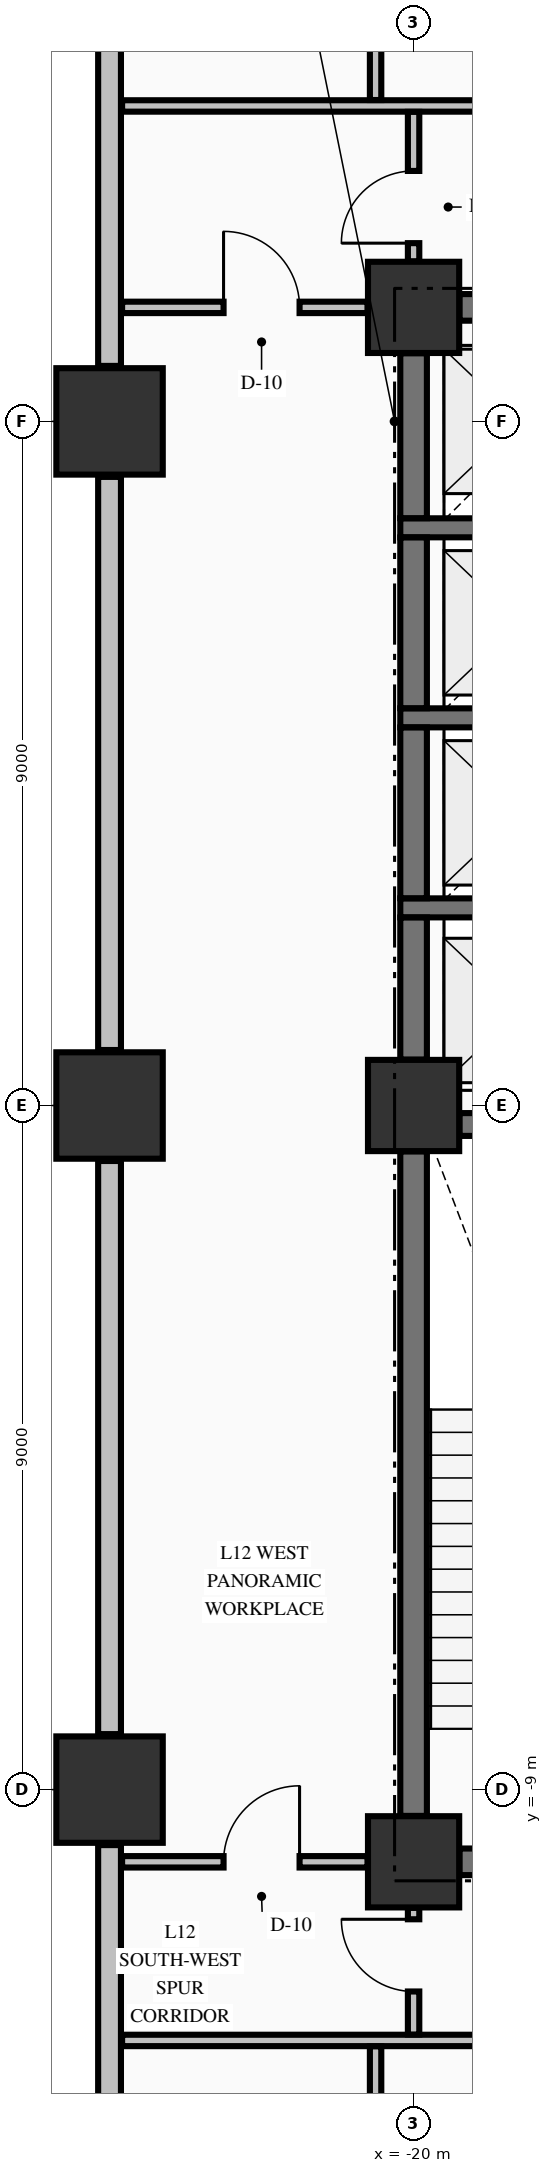
"""IFC4 building model, lengths in metres.
Left out: names, types, materials, properties, quantities, classifications, styles, units other than length and angle.
Written with IfcOpenShell. Run it as: python <this file> out.ifc"""

import sys

from ifc_helpers import new_model, si_unit, direction, frame, frame_2d, origin, origin_2d, place, context, subcontext, project, spatial, rectangle, extrude, element, fill, save


model = new_model("IFC4")
c1 = context("Model", 3, precision=1e-05, world=origin(), true_north=direction((0.0, 1.0)))
c2 = subcontext(c1, "Body", "Model", "MODEL_VIEW")
j1 = project(units=[si_unit("LENGTHUNIT", "METRE"), si_unit("PLANEANGLEUNIT", "RADIAN")], contexts=[c1])
p1 = place(None, origin())
s1 = spatial("IfcSite", under=j1, at=p1, CompositionType="ELEMENT")
p2 = place(p1, origin())
s2 = spatial("IfcBuilding", under=s1, at=p2, CompositionType="ELEMENT")
p3 = place(p2, frame((0.0, 0.0, 52.19)))
s3 = spatial("IfcBuildingStorey", under=s2, at=p3, CompositionType="ELEMENT", Elevation=52.19)
for number, where, z_axis, x_axis in (
    (1, (-24.0, -9.0, -0.425), (0.0, 0.0, 1.0), (1.0, 0.0, 0.0)),
    (2, (-24.0, 0.0, -0.425), (0.0, 0.0, 1.0), (1.0, 0.0, 0.0)),
    (3, (-24.0, 9.0, -0.425), (0.0, 0.0, 1.0), (1.0, 0.0, 0.0)),
):
    element("IfcColumn", number, at=place(p3, frame(where, z_axis=z_axis, x_axis=x_axis)), inside=s3, PredefinedType="COLUMN", context=c2, shape_type="SweptSolid", body=[
        extrude(rectangle(XDim=1.4, YDim=1.4, at=origin_2d()), origin(), (0.0, 0.0, 1.0), 5.0),
    ])
for number, where, z_axis, x_axis in (
    (4, (-20.0, -9.95, -0.425), (0.0, 0.0, 1.0), (1.0, 0.0, 0.0)),
    (5, (-20.0, 10.5, -0.425), (0.0, 0.0, 1.0), (1.0, 0.0, 0.0)),
    (6, (-20.0, 0.0, -0.425), (0.0, 0.0, 1.0), (1.0, 0.0, 0.0)),
):
    element("IfcColumn", number, at=place(p3, frame(where, z_axis=z_axis, x_axis=x_axis)), inside=s3, PredefinedType="COLUMN", context=c2, shape_type="SweptSolid", body=[
        extrude(rectangle(XDim=1.2, YDim=1.2, at=origin_2d()), origin(), (0.0, 0.0, 1.0), 5.0),
    ])
p4 = place(p3, frame((-24.0, -9.73, 0.0), z_axis=(0.0, 0.0, 1.0), x_axis=(0.0, -1.0, 0.0)))
e7 = element("IfcWall", 7, at=p4, inside=s3, PredefinedType="STANDARD", context=c2, shape_type="SweptSolid", body=[
    extrude(rectangle(XDim=12.54, YDim=0.3, at=frame_2d((6.27, 0.0))), origin(), (0.0, 0.0, 1.0), 2.167),
])
for number, where, z_axis, x_axis in (
    (8, (-24.0, -0.73, 0.0), (0.0, 0.0, 1.0), (0.0, -1.0, 0.0)),
    (9, (-24.0, 8.27, 0.0), (0.0, 0.0, 1.0), (0.0, -1.0, 0.0)),
):
    element("IfcWall", number, at=place(p3, frame(where, z_axis=z_axis, x_axis=x_axis)), inside=s3, PredefinedType="STANDARD", context=c2, shape_type="SweptSolid", body=[
        extrude(rectangle(XDim=7.54, YDim=0.3, at=frame_2d((3.77, 0.0))), origin(), (0.0, 0.0, 1.0), 2.167),
    ])
p5 = place(p3, frame((-24.0, 22.27, 0.0), z_axis=(0.0, 0.0, 1.0), x_axis=(0.0, -1.0, 0.0)))
e10 = element("IfcWall", 10, at=p5, inside=s3, PredefinedType="STANDARD", context=c2, shape_type="SweptSolid", body=[
    extrude(rectangle(XDim=12.54, YDim=0.3, at=frame_2d((6.27, 0.0))), origin(), (0.0, 0.0, 1.0), 2.167),
])
p6 = place(p3, frame((-19.396, -9.95, 0.0), z_axis=(0.0, 0.0, 1.0), x_axis=(1.0, 0.0, 0.0)))
e11 = element("IfcWall", 11, at=p6, inside=s3, PredefinedType="SHEAR", context=c2, shape_type="SweptSolid", body=[
    extrude(rectangle(XDim=4.696, YDim=0.35, at=frame_2d((2.348, 0.0))), origin(), (0.0, 0.0, 1.0), 4.575),
])
p7 = place(p6, frame((0.571, 0.0, 0.0)))
e12 = element("IfcOpeningElement", 12, at=p7, cuts=e11, PredefinedType="OPENING", context=c2, shape_type="SweptSolid", body=[
    extrude(rectangle(XDim=1.05, YDim=2.15, at=frame_2d((0.525, 1.075))), frame((0.0, 0.185, 0.0), z_axis=(0.0, -1.0, 0.0), x_axis=(1.0, 0.0, 0.0)), (0.0, 0.0, 1.0), 0.37),
])
p8 = place(p3, frame((-19.396, -0.25, 0.0), z_axis=(0.0, 0.0, 1.0), x_axis=(1.0, 0.0, 0.0)))
e13 = element("IfcWall", 13, at=p8, inside=s3, PredefinedType="SHEAR", context=c2, shape_type="SweptSolid", body=[
    extrude(rectangle(XDim=7.792, YDim=0.3, at=frame_2d((3.896, 0.0))), origin(), (0.0, 0.0, 1.0), 4.575),
])
p9 = place(p8, frame((5.696, 0.0, 0.0)))
e14 = element("IfcOpeningElement", 14, at=p9, cuts=e13, PredefinedType="OPENING", context=c2, shape_type="SweptSolid", body=[
    extrude(rectangle(XDim=1.1, YDim=2.15, at=frame_2d((0.55, 1.075))), frame((0.0, 0.16, 0.0), z_axis=(0.0, -1.0, 0.0), x_axis=(1.0, 0.0, 0.0)), (0.0, 0.0, 1.0), 0.32),
])
for number, where, z_axis, x_axis in (
    (15, (-20.175, 2.6, 0.0), (0.0, 0.0, 1.0), (1.0, 0.0, 0.0)),
    (16, (-20.175, 5.1, 0.0), (0.0, 0.0, 1.0), (1.0, 0.0, 0.0)),
    (17, (-20.175, 7.6, 0.0), (0.0, 0.0, 1.0), (1.0, 0.0, 0.0)),
):
    element("IfcWall", number, at=place(p3, frame(where, z_axis=z_axis, x_axis=x_axis)), inside=s3, PredefinedType="SOLIDWALL", context=c2, shape_type="SweptSolid", body=[
        extrude(rectangle(XDim=3.1, YDim=0.25, at=frame_2d((1.55, 0.0))), origin(), (0.0, 0.0, 1.0), 4.575),
    ])
p10 = place(p3, frame((-19.396, 10.5, 0.0), z_axis=(0.0, 0.0, 1.0), x_axis=(1.0, 0.0, 0.0)))
e18 = element("IfcWall", 18, at=p10, inside=s3, PredefinedType="SHEAR", context=c2, shape_type="SweptSolid", body=[
    extrude(rectangle(XDim=4.696, YDim=0.35, at=frame_2d((2.348, 0.0))), origin(), (0.0, 0.0, 1.0), 4.575),
])
p11 = place(p10, frame((2.796, 0.0, 0.0)))
e19 = element("IfcOpeningElement", 19, at=p11, cuts=e18, PredefinedType="OPENING", context=c2, shape_type="SweptSolid", body=[
    extrude(rectangle(XDim=1.2, YDim=2.15, at=frame_2d((0.6, 1.075))), frame((0.0, 0.185, 0.0), z_axis=(0.0, -1.0, 0.0), x_axis=(1.0, 0.0, 0.0)), (0.0, 0.0, 1.0), 0.37),
])
p12 = place(p3, frame((-23.835, -12.3, 0.0), z_axis=(0.0, 0.0, 1.0), x_axis=(1.0, 0.0, 0.0)))
e20 = element("IfcWall", 20, at=p12, inside=s3, PredefinedType="PARTITIONING", context=c2, shape_type="SweptSolid", body=[
    extrude(rectangle(XDim=52.67, YDim=0.15, at=frame_2d((26.335, 0.0))), origin(), (0.0, 0.0, 1.0), 4.575),
])
p13 = place(p12, frame((8.99, 0.0, 0.0)))
e21 = element("IfcOpeningElement", 21, at=p13, cuts=e20, PredefinedType="OPENING", context=c2, shape_type="SweptSolid", body=[
    extrude(rectangle(XDim=1.05, YDim=2.15, at=frame_2d((0.525, 1.075))), frame((0.0, 0.085, 0.0), z_axis=(0.0, -1.0, 0.0), x_axis=(1.0, 0.0, 0.0)), (0.0, 0.0, 1.0), 0.17),
])
p14 = place(p12, frame((20.96, 0.0, 0.0)))
e22 = element("IfcOpeningElement", 22, at=p14, cuts=e20, PredefinedType="OPENING", context=c2, shape_type="SweptSolid", body=[
    extrude(rectangle(XDim=1.05, YDim=2.15, at=frame_2d((0.525, 1.075))), frame((0.0, 0.085, 0.0), z_axis=(0.0, -1.0, 0.0), x_axis=(1.0, 0.0, 0.0)), (0.0, 0.0, 1.0), 0.17),
])
p15 = place(p12, frame((29.11, 0.0, 0.0)))
e23 = element("IfcOpeningElement", 23, at=p15, cuts=e20, PredefinedType="OPENING", context=c2, shape_type="SweptSolid", body=[
    extrude(rectangle(XDim=1.05, YDim=2.15, at=frame_2d((0.525, 1.075))), frame((0.0, 0.085, 0.0), z_axis=(0.0, -1.0, 0.0), x_axis=(1.0, 0.0, 0.0)), (0.0, 0.0, 1.0), 0.17),
])
p16 = place(p3, frame((-23.835, -9.95, 0.0), z_axis=(0.0, 0.0, 1.0), x_axis=(1.0, 0.0, 0.0)))
e24 = element("IfcWall", 24, at=p16, inside=s3, PredefinedType="PARTITIONING", context=c2, shape_type="SweptSolid", body=[
    extrude(rectangle(XDim=3.229, YDim=0.15, at=frame_2d((1.615, 0.0))), origin(), (0.0, 0.0, 1.0), 4.575),
])
p17 = place(p16, frame((1.335, 0.0, 0.0)))
e25 = element("IfcOpeningElement", 25, at=p17, cuts=e24, PredefinedType="OPENING", context=c2, shape_type="SweptSolid", body=[
    extrude(rectangle(XDim=1.0, YDim=2.15, at=frame_2d((0.5, 1.075))), frame((0.0, 0.085, 0.0), z_axis=(0.0, -1.0, 0.0), x_axis=(1.0, 0.0, 0.0)), (0.0, 0.0, 1.0), 0.17),
])
p18 = place(p3, frame((-23.835, 10.5, 0.0), z_axis=(0.0, 0.0, 1.0), x_axis=(1.0, 0.0, 0.0)))
e26 = element("IfcWall", 26, at=p18, inside=s3, PredefinedType="PARTITIONING", context=c2, shape_type="SweptSolid", body=[
    extrude(rectangle(XDim=3.229, YDim=0.15, at=frame_2d((1.615, 0.0))), origin(), (0.0, 0.0, 1.0), 4.575),
])
p19 = place(p18, frame((1.335, 0.0, 0.0)))
e27 = element("IfcOpeningElement", 27, at=p19, cuts=e26, PredefinedType="OPENING", context=c2, shape_type="SweptSolid", body=[
    extrude(rectangle(XDim=1.0, YDim=2.15, at=frame_2d((0.5, 1.075))), frame((0.0, 0.085, 0.0), z_axis=(0.0, -1.0, 0.0), x_axis=(1.0, 0.0, 0.0)), (0.0, 0.0, 1.0), 0.17),
])
p20 = place(p3, frame((-23.835, 13.15, 0.0), z_axis=(0.0, 0.0, 1.0), x_axis=(1.0, 0.0, 0.0)))
e28 = element("IfcWall", 28, at=p20, inside=s3, PredefinedType="PARTITIONING", context=c2, shape_type="SweptSolid", body=[
    extrude(rectangle(XDim=52.67, YDim=0.15, at=frame_2d((26.335, 0.0))), origin(), (0.0, 0.0, 1.0), 4.575),
])
p21 = place(p20, frame((8.56, 0.0, 0.0)))
e29 = element("IfcOpeningElement", 29, at=p21, cuts=e28, PredefinedType="OPENING", context=c2, shape_type="SweptSolid", body=[
    extrude(rectangle(XDim=1.05, YDim=2.15, at=frame_2d((0.525, 1.075))), frame((0.0, 0.085, 0.0), z_axis=(0.0, -1.0, 0.0), x_axis=(1.0, 0.0, 0.0)), (0.0, 0.0, 1.0), 0.17),
])
p22 = place(p20, frame((16.56, 0.0, 0.0)))
e30 = element("IfcOpeningElement", 30, at=p22, cuts=e28, PredefinedType="OPENING", context=c2, shape_type="SweptSolid", body=[
    extrude(rectangle(XDim=0.95, YDim=2.15, at=frame_2d((0.475, 1.075))), frame((0.0, 0.085, 0.0), z_axis=(0.0, -1.0, 0.0), x_axis=(1.0, 0.0, 0.0)), (0.0, 0.0, 1.0), 0.17),
])
p23 = place(p20, frame((23.81, 0.0, 0.0)))
e31 = element("IfcOpeningElement", 31, at=p23, cuts=e28, PredefinedType="OPENING", context=c2, shape_type="SweptSolid", body=[
    extrude(rectangle(XDim=0.95, YDim=2.02, at=frame_2d((0.475, 1.01))), frame((0.0, 0.085, 0.0), z_axis=(0.0, -1.0, 0.0), x_axis=(1.0, 0.0, 0.0)), (0.0, 0.0, 1.0), 0.17),
])
p24 = place(p20, frame((28.36, 0.0, 0.0)))
e32 = element("IfcOpeningElement", 32, at=p24, cuts=e28, PredefinedType="OPENING", context=c2, shape_type="SweptSolid", body=[
    extrude(rectangle(XDim=0.95, YDim=2.15, at=frame_2d((0.475, 1.075))), frame((0.0, 0.085, 0.0), z_axis=(0.0, -1.0, 0.0), x_axis=(1.0, 0.0, 0.0)), (0.0, 0.0, 1.0), 0.17),
])
p25 = place(p20, frame((35.61, 0.0, 0.0)))
e33 = element("IfcOpeningElement", 33, at=p25, cuts=e28, PredefinedType="OPENING", context=c2, shape_type="SweptSolid", body=[
    extrude(rectangle(XDim=0.95, YDim=2.15, at=frame_2d((0.475, 1.075))), frame((0.0, 0.085, 0.0), z_axis=(0.0, -1.0, 0.0), x_axis=(1.0, 0.0, 0.0)), (0.0, 0.0, 1.0), 0.17),
])
p26 = place(p20, frame((40.16, 0.0, 0.0)))
e34 = element("IfcOpeningElement", 34, at=p26, cuts=e28, PredefinedType="OPENING", context=c2, shape_type="SweptSolid", body=[
    extrude(rectangle(XDim=1.05, YDim=2.15, at=frame_2d((0.525, 1.075))), frame((0.0, 0.085, 0.0), z_axis=(0.0, -1.0, 0.0), x_axis=(1.0, 0.0, 0.0)), (0.0, 0.0, 1.0), 0.17),
])
p27 = place(p3, frame((-20.0, -9.346, 0.0), z_axis=(0.0, 0.0, 1.0), x_axis=(0.0, 1.0, 0.0)))
e35 = element("IfcWall", 35, at=p27, inside=s3, PredefinedType="SHEAR", context=c2, shape_type="SweptSolid", body=[
    extrude(rectangle(XDim=8.742, YDim=0.35, at=frame_2d((4.371, 0.0))), origin(), (0.0, 0.0, 1.0), 4.575),
])
p28 = place(p3, frame((-20.0, 0.604, 0.0), z_axis=(0.0, 0.0, 1.0), x_axis=(0.0, 1.0, 0.0)))
e36 = element("IfcWall", 36, at=p28, inside=s3, PredefinedType="SHEAR", context=c2, shape_type="SweptSolid", body=[
    extrude(rectangle(XDim=1.869, YDim=0.35, at=frame_2d((0.935, 0.0))), origin(), (0.0, 0.0, 1.0), 4.575),
])
for number, where, z_axis, x_axis in (
    (37, (-20.0, 2.727, 0.0), (0.0, 0.0, 1.0), (0.0, 1.0, 0.0)),
    (38, (-20.0, 5.227, 0.0), (0.0, 0.0, 1.0), (0.0, 1.0, 0.0)),
):
    element("IfcWall", number, at=place(p3, frame(where, z_axis=z_axis, x_axis=x_axis)), inside=s3, PredefinedType="SHEAR", context=c2, shape_type="SweptSolid", body=[
        extrude(rectangle(XDim=2.246, YDim=0.35, at=frame_2d((1.123, 0.0))), origin(), (0.0, 0.0, 1.0), 4.575),
    ])
p29 = place(p3, frame((-20.0, 7.727, 0.0), z_axis=(0.0, 0.0, 1.0), x_axis=(0.0, 1.0, 0.0)))
e39 = element("IfcWall", 39, at=p29, inside=s3, PredefinedType="SHEAR", context=c2, shape_type="SweptSolid", body=[
    extrude(rectangle(XDim=2.169, YDim=0.35, at=frame_2d((1.084, 0.0))), origin(), (0.0, 0.0, 1.0), 4.575),
])
p30 = place(p3, frame((-20.5, -22.294, 0.0), z_axis=(0.0, 0.0, 1.0), x_axis=(0.0, 1.0, 0.0)))
e40 = element("IfcWall", 40, at=p30, inside=s3, PredefinedType="PARTITIONING", context=c2, shape_type="SweptSolid", body=[
    extrude(rectangle(XDim=9.916, YDim=0.15, at=frame_2d((4.958, 0.0))), origin(), (0.0, 0.0, 1.0), 4.575),
])
p31 = place(p3, frame((-20.5, 13.228, 0.0), z_axis=(0.0, 0.0, 1.0), x_axis=(0.0, 1.0, 0.0)))
e41 = element("IfcWall", 41, at=p31, inside=s3, PredefinedType="PARTITIONING", context=c2, shape_type="SweptSolid", body=[
    extrude(rectangle(XDim=9.066, YDim=0.15, at=frame_2d((4.533, 0.0))), origin(), (0.0, 0.0, 1.0), 4.575),
])
p32 = place(p3, frame((-20.0, -12.222, 0.0), z_axis=(0.0, 0.0, 1.0), x_axis=(0.0, 1.0, 0.0)))
e42 = element("IfcWall", 42, at=p32, inside=s3, PredefinedType="PARTITIONING", context=c2, shape_type="SweptSolid", body=[
    extrude(rectangle(XDim=1.666, YDim=0.15, at=frame_2d((0.833, 0.0))), origin(), (0.0, 0.0, 1.0), 4.575),
])
p33 = place(p32, frame((0.566, 0.0, 0.0)))
e43 = element("IfcOpeningElement", 43, at=p33, cuts=e42, PredefinedType="OPENING", context=c2, shape_type="SweptSolid", body=[
    extrude(rectangle(XDim=0.95, YDim=2.02, at=frame_2d((0.475, 1.01))), frame((0.0, 0.085, 0.0), z_axis=(0.0, -1.0, 0.0), x_axis=(1.0, 0.0, 0.0)), (0.0, 0.0, 1.0), 0.17),
])
p34 = place(p3, frame((-20.0, 11.106, 0.0), z_axis=(0.0, 0.0, 1.0), x_axis=(0.0, 1.0, 0.0)))
e44 = element("IfcWall", 44, at=p34, inside=s3, PredefinedType="PARTITIONING", context=c2, shape_type="SweptSolid", body=[
    extrude(rectangle(XDim=1.966, YDim=0.15, at=frame_2d((0.983, 0.0))), origin(), (0.0, 0.0, 1.0), 4.575),
])
p35 = place(p34, frame((0.239, 0.0, 0.0)))
e45 = element("IfcOpeningElement", 45, at=p35, cuts=e44, PredefinedType="OPENING", context=c2, shape_type="SweptSolid", body=[
    extrude(rectangle(XDim=0.95, YDim=2.02, at=frame_2d((0.475, 1.01))), frame((0.0, 0.085, 0.0), z_axis=(0.0, -1.0, 0.0), x_axis=(1.0, 0.0, 0.0)), (0.0, 0.0, 1.0), 0.17),
])
p36 = place(p35, origin())
e46 = element("IfcDoor", 46, at=p36, inside=s3, OperationType="SINGLE_SWING_LEFT", PredefinedType="DOOR", context=c2, shape_type="SweptSolid", body=[
    extrude(rectangle(XDim=0.95, YDim=2.02, at=frame_2d((0.475, 1.01))), frame((0.0, 0.025, 0.0), z_axis=(0.0, -1.0, 0.0), x_axis=(1.0, 0.0, 0.0)), (0.0, 0.0, 1.0), 0.05),
])
fill(e45, e46)
p37 = place(p33, origin())
e47 = element("IfcDoor", 47, at=p37, inside=s3, OperationType="SINGLE_SWING_RIGHT", PredefinedType="DOOR", context=c2, shape_type="SweptSolid", body=[
    extrude(rectangle(XDim=0.95, YDim=2.02, at=frame_2d((0.475, 1.01))), frame((0.0, 0.025, 0.0), z_axis=(0.0, -1.0, 0.0), x_axis=(1.0, 0.0, 0.0)), (0.0, 0.0, 1.0), 0.05),
])
fill(e43, e47)
p38 = place(p19, origin())
e48 = element("IfcDoor", 48, at=p38, inside=s3, OperationType="SINGLE_SWING_LEFT", PredefinedType="DOOR", context=c2, shape_type="SweptSolid", body=[
    extrude(rectangle(XDim=1.0, YDim=2.15, at=frame_2d((0.5, 1.075))), frame((0.0, 0.025, 0.0), z_axis=(0.0, -1.0, 0.0), x_axis=(1.0, 0.0, 0.0)), (0.0, 0.0, 1.0), 0.05),
])
fill(e27, e48)
p39 = place(p17, origin())
e49 = element("IfcDoor", 49, at=p39, inside=s3, OperationType="SINGLE_SWING_RIGHT", PredefinedType="DOOR", context=c2, shape_type="SweptSolid", body=[
    extrude(rectangle(XDim=1.0, YDim=2.15, at=frame_2d((0.5, 1.075))), frame((0.0, 0.025, 0.0), z_axis=(0.0, -1.0, 0.0), x_axis=(1.0, 0.0, 0.0)), (0.0, 0.0, 1.0), 0.05),
])
fill(e25, e49)
save(model, sys.argv[1])
